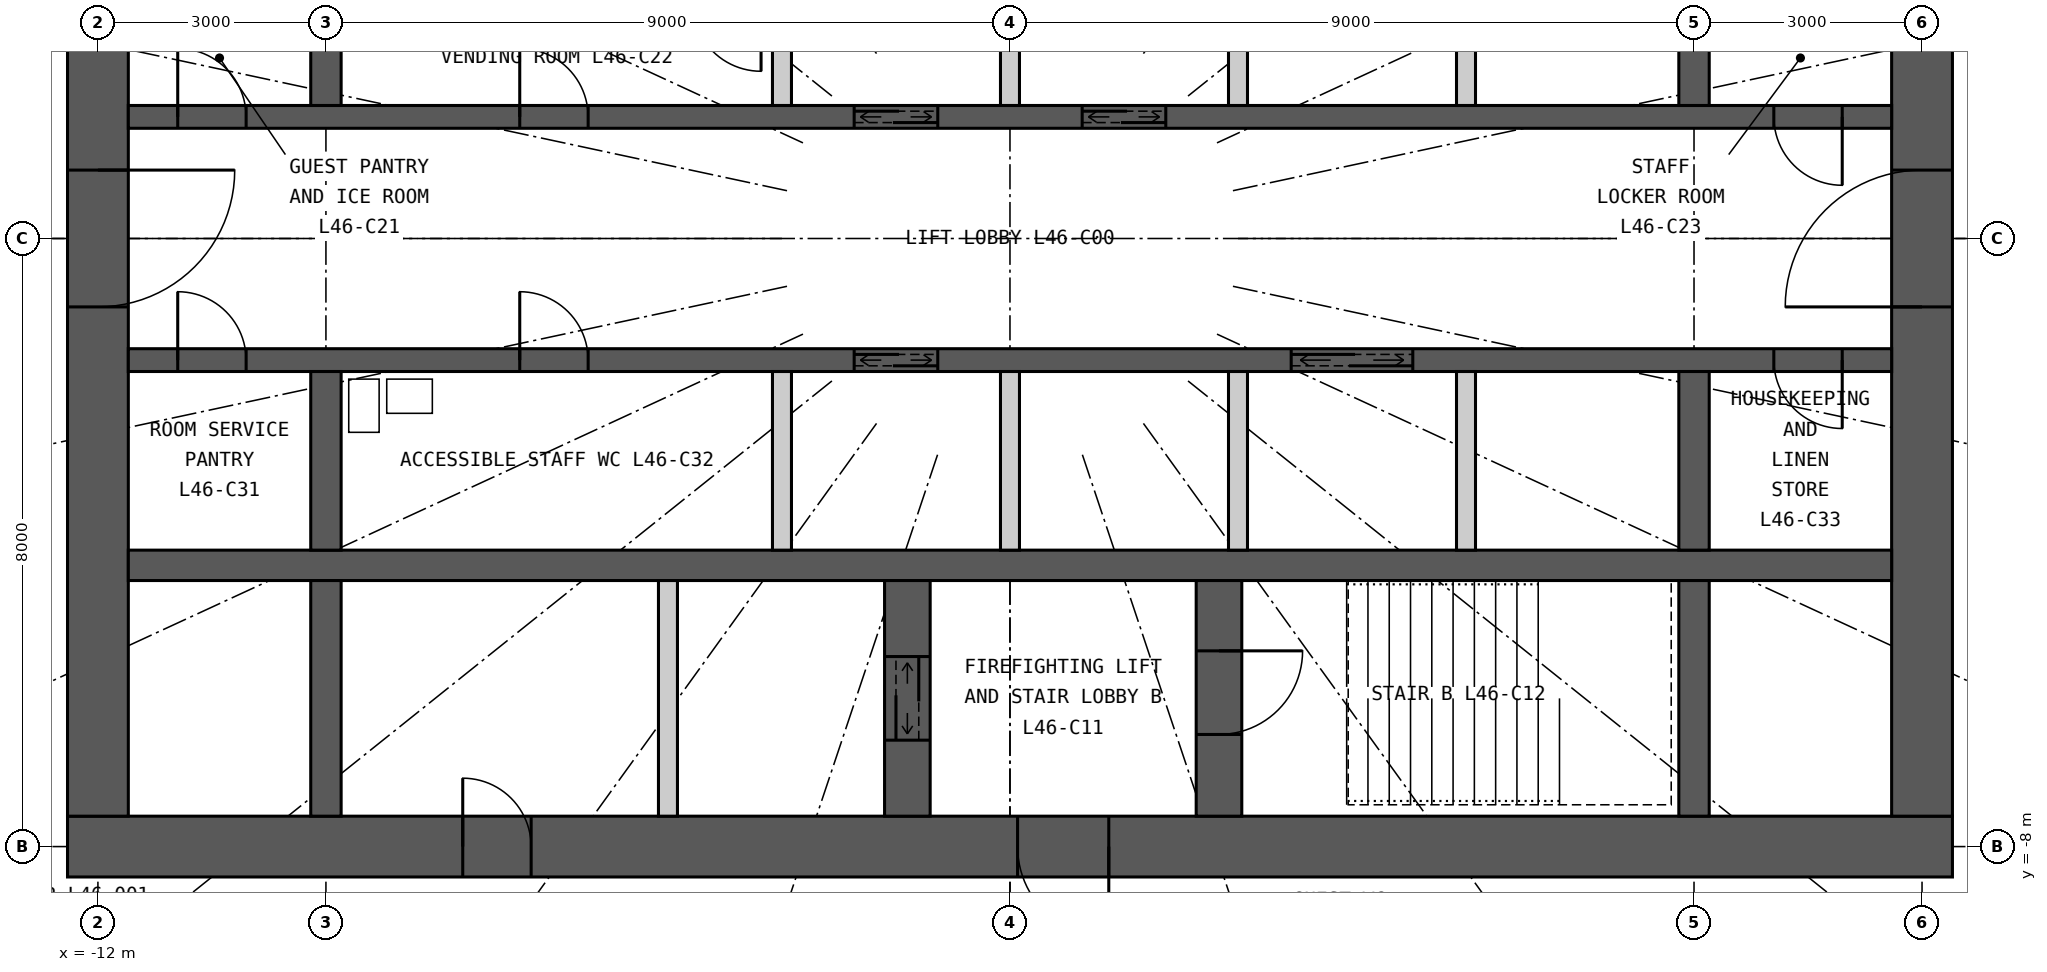
"""IFC4 building model, lengths in metres.
Left out: names, types, materials, properties, quantities, classifications, styles, units other than length and angle.
Written with IfcOpenShell. Run it as: python <this file> out.ifc"""

import sys

from ifc_helpers import new_model, si_unit, direction, frame, frame_2d, origin, place, context, subcontext, project, spatial, rectangle, extrude, element, fill, save


model = new_model("IFC4")
c1 = context("Model", 3, precision=1e-05, world=origin(), true_north=direction((0.0, 1.0)))
c2 = subcontext(c1, "Body", "Model", "MODEL_VIEW")
j1 = project(units=[si_unit("LENGTHUNIT", "METRE"), si_unit("PLANEANGLEUNIT", "RADIAN")], contexts=[c1])
p1 = place(None, origin())
s1 = spatial("IfcSite", under=j1, at=p1, CompositionType="ELEMENT")
p2 = place(p1, origin())
s2 = spatial("IfcBuilding", under=s1, at=p2, CompositionType="ELEMENT")
p3 = place(p2, frame((0.0, 0.0, 173.1)))
s3 = spatial("IfcBuildingStorey", under=s2, at=p3, CompositionType="ELEMENT", Elevation=173.1)
p4 = place(p3, frame((12.4, -8.0, 0.0), z_axis=(0.0, 0.0, 1.0), x_axis=(-1.0, 0.0, 0.0)))
e1 = element("IfcWall", 1, at=p4, inside=s3, PredefinedType="SHEAR", context=c2, shape_type="SweptSolid", body=[
    extrude(rectangle(XDim=24.8, YDim=0.8, at=frame_2d((12.4, 0.0))), origin(), (0.0, 0.0, 1.0), 3.3),
])
p5 = place(p4, frame((11.1, 0.0, 0.0)))
e2 = element("IfcOpeningElement", 2, at=p5, cuts=e1, PredefinedType="OPENING", context=c2, shape_type="SweptSolid", body=[
    extrude(rectangle(XDim=1.2, YDim=2.2, at=frame_2d((0.6, 1.1))), frame((0.0, 0.41, 0.0), z_axis=(0.0, -1.0, 0.0), x_axis=(1.0, 0.0, 0.0)), (0.0, 0.0, 1.0), 0.82),
])
p6 = place(p4, frame((18.7, 0.0, 0.0)))
e3 = element("IfcOpeningElement", 3, at=p6, cuts=e1, PredefinedType="OPENING", context=c2, shape_type="SweptSolid", body=[
    extrude(rectangle(XDim=0.9, YDim=2.2, at=frame_2d((0.45, 1.1))), frame((0.0, 0.41, 0.0), z_axis=(0.0, -1.0, 0.0), x_axis=(1.0, 0.0, 0.0)), (0.0, 0.0, 1.0), 0.82),
])
p7 = place(p3, frame((12.0, -7.6, 0.0), z_axis=(0.0, 0.0, 1.0), x_axis=(0.0, 1.0, 0.0)))
e4 = element("IfcWall", 4, at=p7, inside=s3, PredefinedType="SHEAR", context=c2, shape_type="SweptSolid", body=[
    extrude(rectangle(XDim=15.2, YDim=0.8, at=frame_2d((7.6, 0.0))), origin(), (0.0, 0.0, 1.0), 3.3),
])
p8 = place(p7, frame((6.7, 0.0, 0.0)))
e5 = element("IfcOpeningElement", 5, at=p8, cuts=e4, PredefinedType="OPENING", context=c2, shape_type="SweptSolid", body=[
    extrude(rectangle(XDim=1.8, YDim=2.2, at=frame_2d((0.9, 1.1))), frame((0.0, 0.41, 0.0), z_axis=(0.0, -1.0, 0.0), x_axis=(1.0, 0.0, 0.0)), (0.0, 0.0, 1.0), 0.82),
])
p9 = place(p3, frame((-12.0, 7.6, 0.0), z_axis=(0.0, 0.0, 1.0), x_axis=(0.0, -1.0, 0.0)))
e6 = element("IfcWall", 6, at=p9, inside=s3, PredefinedType="SHEAR", context=c2, shape_type="SweptSolid", body=[
    extrude(rectangle(XDim=15.2, YDim=0.8, at=frame_2d((7.6, 0.0))), origin(), (0.0, 0.0, 1.0), 3.3),
])
p10 = place(p9, frame((6.7, 0.0, 0.0)))
e7 = element("IfcOpeningElement", 7, at=p10, cuts=e6, PredefinedType="OPENING", context=c2, shape_type="SweptSolid", body=[
    extrude(rectangle(XDim=1.8, YDim=2.2, at=frame_2d((0.9, 1.1))), frame((0.0, 0.41, 0.0), z_axis=(0.0, -1.0, 0.0), x_axis=(1.0, 0.0, 0.0)), (0.0, 0.0, 1.0), 0.82),
])
p11 = place(p3, frame((-11.6, 1.6, 0.0), z_axis=(0.0, 0.0, 1.0), x_axis=(1.0, 0.0, 0.0)))
e8 = element("IfcWall", 8, at=p11, inside=s3, PredefinedType="SHEAR", context=c2, shape_type="SweptSolid", body=[
    extrude(rectangle(XDim=23.2, YDim=0.3, at=frame_2d((11.6, 0.0))), origin(), (0.0, 0.0, 1.0), 3.3),
])
p12 = place(p11, frame((9.55, 0.0, 0.0)))
e9 = element("IfcOpeningElement", 9, at=p12, cuts=e8, PredefinedType="OPENING", context=c2, shape_type="SweptSolid", body=[
    extrude(rectangle(XDim=1.1, YDim=2.2, at=frame_2d((0.55, 1.1))), frame((0.0, 0.16, 0.0), z_axis=(0.0, -1.0, 0.0), x_axis=(1.0, 0.0, 0.0)), (0.0, 0.0, 1.0), 0.32),
])
p13 = place(p11, frame((12.55, 0.0, 0.0)))
e10 = element("IfcOpeningElement", 10, at=p13, cuts=e8, PredefinedType="OPENING", context=c2, shape_type="SweptSolid", body=[
    extrude(rectangle(XDim=1.1, YDim=2.2, at=frame_2d((0.55, 1.1))), frame((0.0, 0.16, 0.0), z_axis=(0.0, -1.0, 0.0), x_axis=(1.0, 0.0, 0.0)), (0.0, 0.0, 1.0), 0.32),
])
p14 = place(p11, frame((0.65, 0.0, 0.0)))
e11 = element("IfcOpeningElement", 11, at=p14, cuts=e8, PredefinedType="OPENING", context=c2, shape_type="SweptSolid", body=[
    extrude(rectangle(XDim=0.9, YDim=2.2, at=frame_2d((0.45, 1.1))), frame((0.0, 0.16, 0.0), z_axis=(0.0, -1.0, 0.0), x_axis=(1.0, 0.0, 0.0)), (0.0, 0.0, 1.0), 0.32),
])
p15 = place(p11, frame((5.15, 0.0, 0.0)))
e12 = element("IfcOpeningElement", 12, at=p15, cuts=e8, PredefinedType="OPENING", context=c2, shape_type="SweptSolid", body=[
    extrude(rectangle(XDim=0.9, YDim=2.2, at=frame_2d((0.45, 1.1))), frame((0.0, 0.16, 0.0), z_axis=(0.0, -1.0, 0.0), x_axis=(1.0, 0.0, 0.0)), (0.0, 0.0, 1.0), 0.32),
])
p16 = place(p11, frame((21.65, 0.0, 0.0)))
e13 = element("IfcOpeningElement", 13, at=p16, cuts=e8, PredefinedType="OPENING", context=c2, shape_type="SweptSolid", body=[
    extrude(rectangle(XDim=0.9, YDim=2.2, at=frame_2d((0.45, 1.1))), frame((0.0, 0.16, 0.0), z_axis=(0.0, -1.0, 0.0), x_axis=(1.0, 0.0, 0.0)), (0.0, 0.0, 1.0), 0.32),
])
p17 = place(p3, frame((-11.6, -4.3, 0.0), z_axis=(0.0, 0.0, 1.0), x_axis=(1.0, 0.0, 0.0)))
e14 = element("IfcWall", 14, at=p17, inside=s3, PredefinedType="SHEAR", context=c2, shape_type="SweptSolid", body=[
    extrude(rectangle(XDim=23.2, YDim=0.4, at=frame_2d((11.6, 0.0))), origin(), (0.0, 0.0, 1.0), 3.3),
])
p18 = place(p3, frame((-11.6, -1.6, 0.0), z_axis=(0.0, 0.0, 1.0), x_axis=(1.0, 0.0, 0.0)))
e15 = element("IfcWall", 15, at=p18, inside=s3, PredefinedType="SHEAR", context=c2, shape_type="SweptSolid", body=[
    extrude(rectangle(XDim=23.2, YDim=0.3, at=frame_2d((11.6, 0.0))), origin(), (0.0, 0.0, 1.0), 3.3),
])
p19 = place(p18, frame((9.55, 0.0, 0.0)))
e16 = element("IfcOpeningElement", 16, at=p19, cuts=e15, PredefinedType="OPENING", context=c2, shape_type="SweptSolid", body=[
    extrude(rectangle(XDim=1.1, YDim=2.2, at=frame_2d((0.55, 1.1))), frame((0.0, 0.16, 0.0), z_axis=(0.0, -1.0, 0.0), x_axis=(1.0, 0.0, 0.0)), (0.0, 0.0, 1.0), 0.32),
])
p20 = place(p18, frame((15.3, 0.0, 0.0)))
e17 = element("IfcOpeningElement", 17, at=p20, cuts=e15, PredefinedType="OPENING", context=c2, shape_type="SweptSolid", body=[
    extrude(rectangle(XDim=1.6, YDim=2.4, at=frame_2d((0.8, 1.2))), frame((0.0, 0.16, 0.0), z_axis=(0.0, -1.0, 0.0), x_axis=(1.0, 0.0, 0.0)), (0.0, 0.0, 1.0), 0.32),
])
p21 = place(p18, frame((0.65, 0.0, 0.0)))
e18 = element("IfcOpeningElement", 18, at=p21, cuts=e15, PredefinedType="OPENING", context=c2, shape_type="SweptSolid", body=[
    extrude(rectangle(XDim=0.9, YDim=2.2, at=frame_2d((0.45, 1.1))), frame((0.0, 0.16, 0.0), z_axis=(0.0, -1.0, 0.0), x_axis=(1.0, 0.0, 0.0)), (0.0, 0.0, 1.0), 0.32),
])
p22 = place(p18, frame((5.15, 0.0, 0.0)))
e19 = element("IfcOpeningElement", 19, at=p22, cuts=e15, PredefinedType="OPENING", context=c2, shape_type="SweptSolid", body=[
    extrude(rectangle(XDim=0.9, YDim=2.2, at=frame_2d((0.45, 1.1))), frame((0.0, 0.16, 0.0), z_axis=(0.0, -1.0, 0.0), x_axis=(1.0, 0.0, 0.0)), (0.0, 0.0, 1.0), 0.32),
])
p23 = place(p18, frame((21.65, 0.0, 0.0)))
e20 = element("IfcOpeningElement", 20, at=p23, cuts=e15, PredefinedType="OPENING", context=c2, shape_type="SweptSolid", body=[
    extrude(rectangle(XDim=0.9, YDim=2.2, at=frame_2d((0.45, 1.1))), frame((0.0, 0.16, 0.0), z_axis=(0.0, -1.0, 0.0), x_axis=(1.0, 0.0, 0.0)), (0.0, 0.0, 1.0), 0.32),
])
for number, where, z_axis, x_axis in (
    (21, (-9.0, 1.75, 0.0), (0.0, 0.0, 1.0), (0.0, 1.0, 0.0)),
    (22, (-9.0, -4.1, 0.0), (0.0, 0.0, 1.0), (0.0, 1.0, 0.0)),
):
    element("IfcWall", number, at=place(p3, frame(where, z_axis=z_axis, x_axis=x_axis)), inside=s3, PredefinedType="SHEAR", context=c2, shape_type="SweptSolid", body=[
        extrude(rectangle(XDim=2.35, YDim=0.4, at=frame_2d((1.175, 0.0))), origin(), (0.0, 0.0, 1.0), 3.3),
    ])
p24 = place(p3, frame((-9.0, -7.6, 0.0), z_axis=(0.0, 0.0, 1.0), x_axis=(0.0, 1.0, 0.0)))
e23 = element("IfcWall", 23, at=p24, inside=s3, PredefinedType="SHEAR", context=c2, shape_type="SweptSolid", body=[
    extrude(rectangle(XDim=3.1, YDim=0.4, at=frame_2d((1.55, 0.0))), origin(), (0.0, 0.0, 1.0), 3.3),
])
for number, where, z_axis, x_axis in (
    (24, (9.0, 1.75, 0.0), (0.0, 0.0, 1.0), (0.0, 1.0, 0.0)),
    (25, (9.0, -4.1, 0.0), (0.0, 0.0, 1.0), (0.0, 1.0, 0.0)),
):
    element("IfcWall", number, at=place(p3, frame(where, z_axis=z_axis, x_axis=x_axis)), inside=s3, PredefinedType="SHEAR", context=c2, shape_type="SweptSolid", body=[
        extrude(rectangle(XDim=2.35, YDim=0.4, at=frame_2d((1.175, 0.0))), origin(), (0.0, 0.0, 1.0), 3.3),
    ])
p25 = place(p3, frame((9.0, -7.6, 0.0), z_axis=(0.0, 0.0, 1.0), x_axis=(0.0, 1.0, 0.0)))
e26 = element("IfcWall", 26, at=p25, inside=s3, PredefinedType="SHEAR", context=c2, shape_type="SweptSolid", body=[
    extrude(rectangle(XDim=3.1, YDim=0.4, at=frame_2d((1.55, 0.0))), origin(), (0.0, 0.0, 1.0), 3.3),
])
p26 = place(p3, frame((2.75, -7.6, 0.0), z_axis=(0.0, 0.0, 1.0), x_axis=(0.0, 1.0, 0.0)))
e27 = element("IfcWall", 27, at=p26, inside=s3, PredefinedType="SHEAR", context=c2, shape_type="SweptSolid", body=[
    extrude(rectangle(XDim=3.1, YDim=0.6, at=frame_2d((1.55, 0.0))), origin(), (0.0, 0.0, 1.0), 3.3),
])
p27 = place(p26, frame((1.075, 0.0, 0.0)))
e28 = element("IfcOpeningElement", 28, at=p27, cuts=e27, PredefinedType="OPENING", context=c2, shape_type="SweptSolid", body=[
    extrude(rectangle(XDim=1.1, YDim=2.2, at=frame_2d((0.55, 1.1))), frame((0.0, 0.31, 0.0), z_axis=(0.0, -1.0, 0.0), x_axis=(1.0, 0.0, 0.0)), (0.0, 0.0, 1.0), 0.62),
])
p28 = place(p3, frame((-1.35, -7.6, 0.0), z_axis=(0.0, 0.0, 1.0), x_axis=(0.0, 1.0, 0.0)))
e29 = element("IfcWall", 29, at=p28, inside=s3, PredefinedType="SHEAR", context=c2, shape_type="SweptSolid", body=[
    extrude(rectangle(XDim=3.1, YDim=0.6, at=frame_2d((1.55, 0.0))), origin(), (0.0, 0.0, 1.0), 3.3),
])
p29 = place(p28, frame((1.0, 0.0, 0.0)))
e30 = element("IfcOpeningElement", 30, at=p29, cuts=e29, PredefinedType="OPENING", context=c2, shape_type="SweptSolid", body=[
    extrude(rectangle(XDim=1.1, YDim=2.2, at=frame_2d((0.55, 1.1))), frame((0.0, 0.31, 0.0), z_axis=(0.0, -1.0, 0.0), x_axis=(1.0, 0.0, 0.0)), (0.0, 0.0, 1.0), 0.62),
])
p30 = place(p3, frame((-4.5, -7.6, 0.0), z_axis=(0.0, 0.0, 1.0), x_axis=(0.0, 1.0, 0.0)))
e31 = element("IfcWall", 31, at=p30, inside=s3, PredefinedType="PARTITIONING", context=c2, shape_type="SweptSolid", body=[
    extrude(rectangle(XDim=3.1, YDim=0.25, at=frame_2d((1.55, 0.0))), origin(), (0.0, 0.0, 1.0), 3.3),
])
for number, where, z_axis, x_axis in (
    (32, (-3.0, 1.75, 0.0), (0.0, 0.0, 1.0), (0.0, 1.0, 0.0)),
    (33, (0.0, 1.75, 0.0), (0.0, 0.0, 1.0), (0.0, 1.0, 0.0)),
    (34, (3.0, 1.75, 0.0), (0.0, 0.0, 1.0), (0.0, 1.0, 0.0)),
    (35, (6.0, 1.75, 0.0), (0.0, 0.0, 1.0), (0.0, 1.0, 0.0)),
    (36, (-3.0, -4.1, 0.0), (0.0, 0.0, 1.0), (0.0, 1.0, 0.0)),
    (37, (0.0, -4.1, 0.0), (0.0, 0.0, 1.0), (0.0, 1.0, 0.0)),
    (38, (3.0, -4.1, 0.0), (0.0, 0.0, 1.0), (0.0, 1.0, 0.0)),
    (39, (6.0, -4.1, 0.0), (0.0, 0.0, 1.0), (0.0, 1.0, 0.0)),
):
    element("IfcWall", number, at=place(p3, frame(where, z_axis=z_axis, x_axis=x_axis)), inside=s3, PredefinedType="PARTITIONING", context=c2, shape_type="SweptSolid", body=[
        extrude(rectangle(XDim=2.35, YDim=0.25, at=frame_2d((1.175, 0.0))), origin(), (0.0, 0.0, 1.0), 3.3),
    ])
p31 = place(p5, origin())
e40 = element("IfcDoor", 40, at=p31, inside=s3, OperationType="SINGLE_SWING_LEFT", PredefinedType="DOOR", context=c2, shape_type="SweptSolid", body=[
    extrude(rectangle(XDim=1.2, YDim=2.2, at=frame_2d((0.6, 1.1))), frame((0.0, 0.025, 0.0), z_axis=(0.0, -1.0, 0.0), x_axis=(1.0, 0.0, 0.0)), (0.0, 0.0, 1.0), 0.05),
])
fill(e2, e40)
p32 = place(p27, origin())
e41 = element("IfcDoor", 41, at=p32, inside=s3, OperationType="SINGLE_SWING_RIGHT", PredefinedType="DOOR", context=c2, shape_type="SweptSolid", body=[
    extrude(rectangle(XDim=1.1, YDim=2.2, at=frame_2d((0.55, 1.1))), frame((0.0, 0.025, 0.0), z_axis=(0.0, -1.0, 0.0), x_axis=(1.0, 0.0, 0.0)), (0.0, 0.0, 1.0), 0.05),
])
fill(e28, e41)
p33 = place(p29, origin())
e42 = element("IfcDoor", 42, at=p33, inside=s3, OperationType="DOUBLE_DOOR_SLIDING", PredefinedType="DOOR", context=c2, shape_type="SweptSolid", body=[
    extrude(rectangle(XDim=1.1, YDim=2.2, at=frame_2d((0.55, 1.1))), frame((0.0, 0.025, 0.0), z_axis=(0.0, -1.0, 0.0), x_axis=(1.0, 0.0, 0.0)), (0.0, 0.0, 1.0), 0.05),
])
fill(e30, e42)
p34 = place(p6, origin())
e43 = element("IfcDoor", 43, at=p34, inside=s3, OperationType="SINGLE_SWING_RIGHT", PredefinedType="DOOR", context=c2, shape_type="SweptSolid", body=[
    extrude(rectangle(XDim=0.9, YDim=2.2, at=frame_2d((0.45, 1.1))), frame((0.0, 0.025, 0.0), z_axis=(0.0, -1.0, 0.0), x_axis=(1.0, 0.0, 0.0)), (0.0, 0.0, 1.0), 0.05),
])
fill(e3, e43)
p35 = place(p12, origin())
e44 = element("IfcDoor", 44, at=p35, inside=s3, OperationType="DOUBLE_DOOR_SLIDING", PredefinedType="DOOR", context=c2, shape_type="SweptSolid", body=[
    extrude(rectangle(XDim=1.1, YDim=2.2, at=frame_2d((0.55, 1.1))), frame((0.0, 0.025, 0.0), z_axis=(0.0, -1.0, 0.0), x_axis=(1.0, 0.0, 0.0)), (0.0, 0.0, 1.0), 0.05),
])
fill(e9, e44)
p36 = place(p13, origin())
e45 = element("IfcDoor", 45, at=p36, inside=s3, OperationType="DOUBLE_DOOR_SLIDING", PredefinedType="DOOR", context=c2, shape_type="SweptSolid", body=[
    extrude(rectangle(XDim=1.1, YDim=2.2, at=frame_2d((0.55, 1.1))), frame((0.0, 0.025, 0.0), z_axis=(0.0, -1.0, 0.0), x_axis=(1.0, 0.0, 0.0)), (0.0, 0.0, 1.0), 0.05),
])
fill(e10, e45)
p37 = place(p19, origin())
e46 = element("IfcDoor", 46, at=p37, inside=s3, OperationType="DOUBLE_DOOR_SLIDING", PredefinedType="DOOR", context=c2, shape_type="SweptSolid", body=[
    extrude(rectangle(XDim=1.1, YDim=2.2, at=frame_2d((0.55, 1.1))), frame((0.0, 0.025, 0.0), z_axis=(0.0, -1.0, 0.0), x_axis=(1.0, 0.0, 0.0)), (0.0, 0.0, 1.0), 0.05),
])
fill(e16, e46)
p38 = place(p20, origin())
e47 = element("IfcDoor", 47, at=p38, inside=s3, OperationType="DOUBLE_DOOR_SLIDING", PredefinedType="DOOR", context=c2, shape_type="SweptSolid", body=[
    extrude(rectangle(XDim=1.6, YDim=2.4, at=frame_2d((0.8, 1.2))), frame((0.0, 0.025, 0.0), z_axis=(0.0, -1.0, 0.0), x_axis=(1.0, 0.0, 0.0)), (0.0, 0.0, 1.0), 0.05),
])
fill(e17, e47)
p39 = place(p14, origin())
e48 = element("IfcDoor", 48, at=p39, inside=s3, OperationType="SINGLE_SWING_LEFT", PredefinedType="DOOR", context=c2, shape_type="SweptSolid", body=[
    extrude(rectangle(XDim=0.9, YDim=2.2, at=frame_2d((0.45, 1.1))), frame((0.0, 0.025, 0.0), z_axis=(0.0, -1.0, 0.0), x_axis=(1.0, 0.0, 0.0)), (0.0, 0.0, 1.0), 0.05),
])
fill(e11, e48)
p40 = place(p15, origin())
e49 = element("IfcDoor", 49, at=p40, inside=s3, OperationType="SINGLE_SWING_LEFT", PredefinedType="DOOR", context=c2, shape_type="SweptSolid", body=[
    extrude(rectangle(XDim=0.9, YDim=2.2, at=frame_2d((0.45, 1.1))), frame((0.0, 0.025, 0.0), z_axis=(0.0, -1.0, 0.0), x_axis=(1.0, 0.0, 0.0)), (0.0, 0.0, 1.0), 0.05),
])
fill(e12, e49)
p41 = place(p21, origin())
e50 = element("IfcDoor", 50, at=p41, inside=s3, OperationType="SINGLE_SWING_LEFT", PredefinedType="DOOR", context=c2, shape_type="SweptSolid", body=[
    extrude(rectangle(XDim=0.9, YDim=2.2, at=frame_2d((0.45, 1.1))), frame((0.0, 0.025, 0.0), z_axis=(0.0, -1.0, 0.0), x_axis=(1.0, 0.0, 0.0)), (0.0, 0.0, 1.0), 0.05),
])
fill(e18, e50)
p42 = place(p22, origin())
e51 = element("IfcDoor", 51, at=p42, inside=s3, OperationType="SINGLE_SWING_LEFT", PredefinedType="DOOR", context=c2, shape_type="SweptSolid", body=[
    extrude(rectangle(XDim=0.9, YDim=2.2, at=frame_2d((0.45, 1.1))), frame((0.0, 0.025, 0.0), z_axis=(0.0, -1.0, 0.0), x_axis=(1.0, 0.0, 0.0)), (0.0, 0.0, 1.0), 0.05),
])
fill(e19, e51)
p43 = place(p23, origin())
e52 = element("IfcDoor", 52, at=p43, inside=s3, OperationType="SINGLE_SWING_RIGHT", PredefinedType="DOOR", context=c2, shape_type="SweptSolid", body=[
    extrude(rectangle(XDim=0.9, YDim=2.2, at=frame_2d((0.45, 1.1))), frame((0.0, 0.025, 0.0), z_axis=(0.0, -1.0, 0.0), x_axis=(1.0, 0.0, 0.0)), (0.0, 0.0, 1.0), 0.05),
])
fill(e20, e52)
p44 = place(p16, origin())
e53 = element("IfcDoor", 53, at=p44, inside=s3, OperationType="SINGLE_SWING_RIGHT", PredefinedType="DOOR", context=c2, shape_type="SweptSolid", body=[
    extrude(rectangle(XDim=0.9, YDim=2.2, at=frame_2d((0.45, 1.1))), frame((0.0, 0.025, 0.0), z_axis=(0.0, -1.0, 0.0), x_axis=(1.0, 0.0, 0.0)), (0.0, 0.0, 1.0), 0.05),
])
fill(e13, e53)
p45 = place(p8, origin())
e54 = element("IfcDoor", 54, at=p45, inside=s3, OperationType="DOUBLE_DOOR_DOUBLE_SWING", PredefinedType="DOOR", context=c2, shape_type="SweptSolid", body=[
    extrude(rectangle(XDim=1.8, YDim=2.2, at=frame_2d((0.9, 1.1))), frame((0.0, 0.025, 0.0), z_axis=(0.0, -1.0, 0.0), x_axis=(1.0, 0.0, 0.0)), (0.0, 0.0, 1.0), 0.05),
])
fill(e5, e54)
p46 = place(p10, origin())
e55 = element("IfcDoor", 55, at=p46, inside=s3, OperationType="DOUBLE_DOOR_DOUBLE_SWING", PredefinedType="DOOR", context=c2, shape_type="SweptSolid", body=[
    extrude(rectangle(XDim=1.8, YDim=2.2, at=frame_2d((0.9, 1.1))), frame((0.0, 0.025, 0.0), z_axis=(0.0, -1.0, 0.0), x_axis=(1.0, 0.0, 0.0)), (0.0, 0.0, 1.0), 0.05),
])
fill(e7, e55)
save(model, sys.argv[1])
